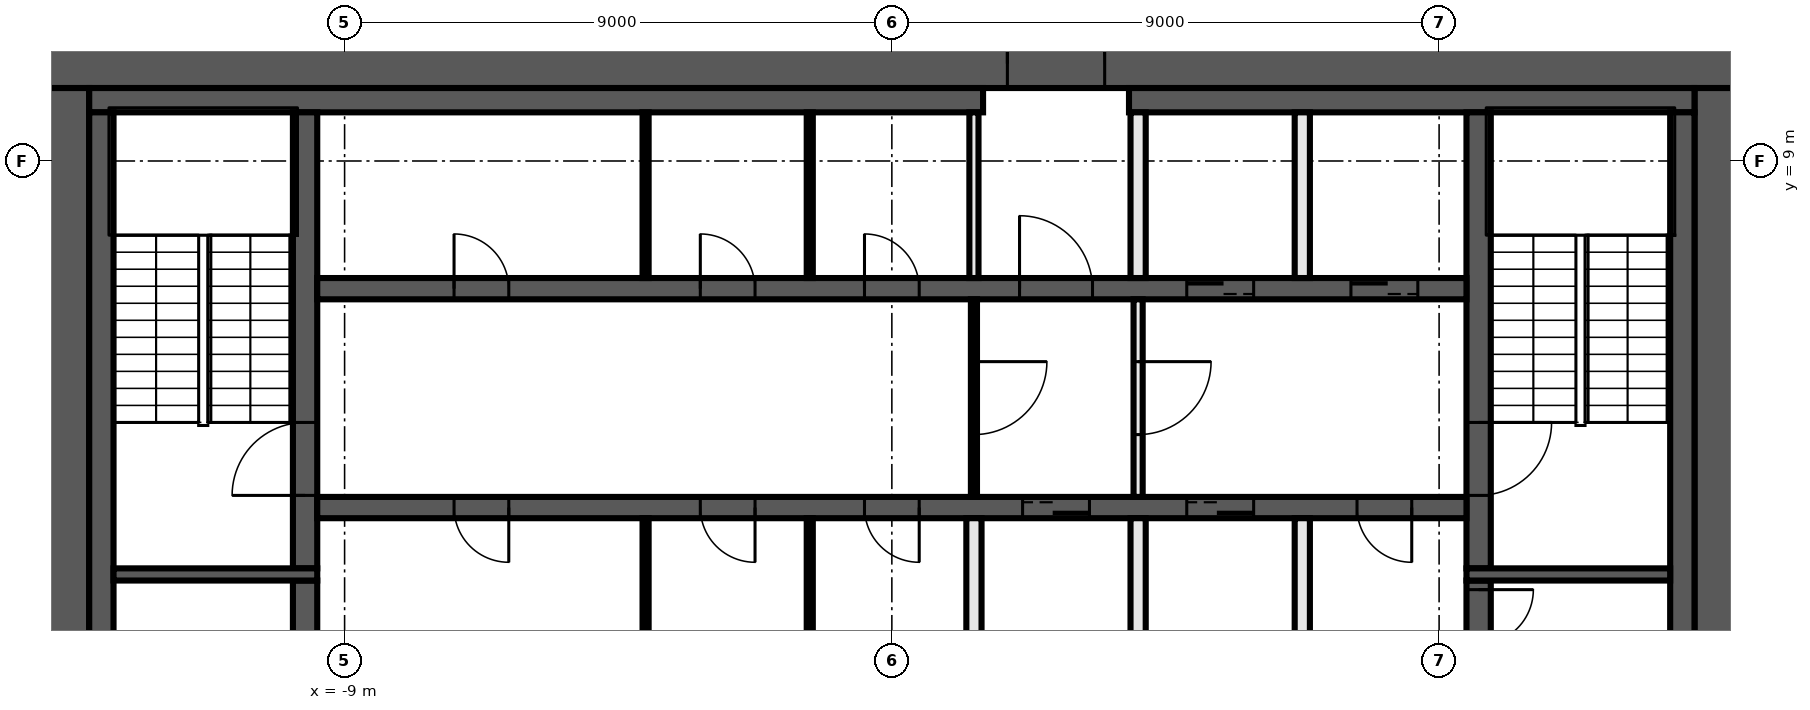
"""IFC4 building model, lengths in metres.
Left out: names, types, materials, properties, quantities, classifications, styles, units other than length and angle.
Written with IfcOpenShell. Run it as: python <this file> out.ifc"""

import sys

from ifc_helpers import new_model, si_unit, direction, frame, frame_2d, origin, place, context, subcontext, project, spatial, rectangle, extrude, element, fill, save


model = new_model("IFC4")
c1 = context("Model", 3, precision=1e-05, world=origin(), true_north=direction((0.0, 1.0)))
c2 = subcontext(c1, "Body", "Model", "MODEL_VIEW")
j1 = project(units=[si_unit("LENGTHUNIT", "METRE"), si_unit("PLANEANGLEUNIT", "RADIAN")], contexts=[c1])
p1 = place(None, origin())
s1 = spatial("IfcSite", under=j1, at=p1, CompositionType="ELEMENT")
p2 = place(p1, origin())
s2 = spatial("IfcBuilding", under=s1, at=p2, CompositionType="ELEMENT")
p3 = place(p2, frame((0.0, 0.0, 162.8)))
s3 = spatial("IfcBuildingStorey", under=s2, at=p3, CompositionType="ELEMENT", Elevation=162.8)
p4 = place(p3, frame((-14.0, 10.6, 0.0), z_axis=(0.0, 0.0, 1.0), x_axis=(1.0, 0.0, 0.0)))
e1 = element("IfcWall", 1, at=p4, inside=s3, PredefinedType="SHEAR", context=c2, shape_type="SweptSolid", body=[
    extrude(rectangle(XDim=28.0, YDim=0.8, at=frame_2d((14.0, 0.0))), origin(), (0.0, 0.0, 1.0), 3.82),
])
p5 = place(p4, frame((15.9, 0.0, 0.0)))
e2 = element("IfcOpeningElement", 2, at=p5, cuts=e1, PredefinedType="OPENING", context=c2, shape_type="SweptSolid", body=[
    extrude(rectangle(XDim=1.6, YDim=2.1, at=frame_2d((0.8, 1.05))), frame((0.0, 0.41, 0.0), z_axis=(0.0, -1.0, 0.0), x_axis=(1.0, 0.0, 0.0)), (0.0, 0.0, 1.0), 0.82),
])
for number, where, z_axis, x_axis in (
    (3, (13.6, 10.2, 0.0), (0.0, 0.0, 1.0), (0.0, -1.0, 0.0)),
    (4, (-13.6, -10.2, 0.0), (0.0, 0.0, 1.0), (0.0, 1.0, 0.0)),
):
    element("IfcWall", number, at=place(p3, frame(where, z_axis=z_axis, x_axis=x_axis)), inside=s3, PredefinedType="SHEAR", context=c2, shape_type="SweptSolid", body=[
        extrude(rectangle(XDim=20.4, YDim=0.8, at=frame_2d((10.2, 0.0))), origin(), (0.0, 0.0, 1.0), 3.82),
    ])
p6 = place(p3, frame((-13.2, 10.0, 0.0), z_axis=(0.0, 0.0, 1.0), x_axis=(1.0, 0.0, 0.0)))
e5 = element("IfcWall", 5, at=p6, inside=s3, PredefinedType="SHEAR", context=c2, shape_type="SweptSolid", body=[
    extrude(rectangle(XDim=14.7, YDim=0.4, at=frame_2d((7.35, 0.0))), origin(), (0.0, 0.0, 1.0), 3.82),
])
p7 = place(p3, frame((3.9, 10.0, 0.0), z_axis=(0.0, 0.0, 1.0), x_axis=(1.0, 0.0, 0.0)))
e6 = element("IfcWall", 6, at=p7, inside=s3, PredefinedType="SHEAR", context=c2, shape_type="SweptSolid", body=[
    extrude(rectangle(XDim=9.3, YDim=0.4, at=frame_2d((4.65, 0.0))), origin(), (0.0, 0.0, 1.0), 3.82),
])
for number, where, z_axis, x_axis in (
    (7, (13.0, 9.8, 0.0), (0.0, 0.0, 1.0), (0.0, -1.0, 0.0)),
    (8, (-13.0, -9.8, 0.0), (0.0, 0.0, 1.0), (0.0, 1.0, 0.0)),
):
    element("IfcWall", number, at=place(p3, frame(where, z_axis=z_axis, x_axis=x_axis)), inside=s3, PredefinedType="SHEAR", context=c2, shape_type="SweptSolid", body=[
        extrude(rectangle(XDim=19.6, YDim=0.4, at=frame_2d((9.8, 0.0))), origin(), (0.0, 0.0, 1.0), 3.82),
    ])
p8 = place(p3, frame((9.65, 2.1, 0.0), z_axis=(0.0, 0.0, 1.0), x_axis=(0.0, -1.0, 0.0)))
e9 = element("IfcWall", 9, at=p8, inside=s3, PredefinedType="SHEAR", context=c2, shape_type="SweptSolid", body=[
    extrude(rectangle(XDim=4.2, YDim=0.4, at=frame_2d((2.1, 0.0))), origin(), (0.0, 0.0, 1.0), 3.82),
])
p9 = place(p8, frame((0.15, 0.0, 0.0)))
e10 = element("IfcOpeningElement", 10, at=p9, cuts=e9, PredefinedType="OPENING", context=c2, shape_type="SweptSolid", body=[
    extrude(rectangle(XDim=0.9, YDim=2.1, at=frame_2d((0.45, 1.05))), frame((0.0, 0.21, 0.0), z_axis=(0.0, -1.0, 0.0), x_axis=(1.0, 0.0, 0.0)), (0.0, 0.0, 1.0), 0.42),
])
p10 = place(p3, frame((9.65, 9.8, 0.0), z_axis=(0.0, 0.0, 1.0), x_axis=(0.0, -1.0, 0.0)))
e11 = element("IfcWall", 11, at=p10, inside=s3, PredefinedType="SHEAR", context=c2, shape_type="SweptSolid", body=[
    extrude(rectangle(XDim=7.5, YDim=0.4, at=frame_2d((3.75, 0.0))), origin(), (0.0, 0.0, 1.0), 3.82),
])
p11 = place(p10, frame((5.1, 0.0, 0.0)))
e12 = element("IfcOpeningElement", 12, at=p11, cuts=e11, PredefinedType="OPENING", context=c2, shape_type="SweptSolid", body=[
    extrude(rectangle(XDim=1.2, YDim=2.1, at=frame_2d((0.6, 1.05))), frame((0.0, 0.21, 0.0), z_axis=(0.0, -1.0, 0.0), x_axis=(1.0, 0.0, 0.0)), (0.0, 0.0, 1.0), 0.42),
])
p12 = place(p3, frame((-9.65, -2.1, 0.0), z_axis=(0.0, 0.0, 1.0), x_axis=(0.0, 1.0, 0.0)))
e13 = element("IfcWall", 13, at=p12, inside=s3, PredefinedType="SHEAR", context=c2, shape_type="SweptSolid", body=[
    extrude(rectangle(XDim=4.2, YDim=0.4, at=frame_2d((2.1, 0.0))), origin(), (0.0, 0.0, 1.0), 3.82),
])
p13 = place(p3, frame((-9.65, 2.3, 0.0), z_axis=(0.0, 0.0, 1.0), x_axis=(0.0, 1.0, 0.0)))
e14 = element("IfcWall", 14, at=p13, inside=s3, PredefinedType="SHEAR", context=c2, shape_type="SweptSolid", body=[
    extrude(rectangle(XDim=7.5, YDim=0.4, at=frame_2d((3.75, 0.0))), origin(), (0.0, 0.0, 1.0), 3.82),
])
p14 = place(p13, frame((1.2, 0.0, 0.0)))
e15 = element("IfcOpeningElement", 15, at=p14, cuts=e14, PredefinedType="OPENING", context=c2, shape_type="SweptSolid", body=[
    extrude(rectangle(XDim=1.2, YDim=2.1, at=frame_2d((0.6, 1.05))), frame((0.0, 0.21, 0.0), z_axis=(0.0, -1.0, 0.0), x_axis=(1.0, 0.0, 0.0)), (0.0, 0.0, 1.0), 0.42),
])
for number, where, z_axis, x_axis in (
    (16, (9.45, 2.2, 0.0), (0.0, 0.0, 1.0), (1.0, 0.0, 0.0)),
    (17, (-9.45, 2.2, 0.0), (0.0, 0.0, 1.0), (-1.0, 0.0, 0.0)),
):
    element("IfcWall", number, at=place(p3, frame(where, z_axis=z_axis, x_axis=x_axis)), inside=s3, PredefinedType="SHEAR", context=c2, shape_type="SweptSolid", body=[
        extrude(rectangle(XDim=3.35, YDim=0.2, at=frame_2d((1.675, 0.0))), origin(), (0.0, 0.0, 1.0), 3.82),
    ])
p15 = place(p3, frame((-9.45, 6.9, 0.0), z_axis=(0.0, 0.0, 1.0), x_axis=(1.0, 0.0, 0.0)))
e18 = element("IfcWall", 18, at=p15, inside=s3, PredefinedType="SHEAR", context=c2, shape_type="SweptSolid", body=[
    extrude(rectangle(XDim=18.9, YDim=0.35, at=frame_2d((9.45, 0.0))), origin(), (0.0, 0.0, 1.0), 3.82),
])
p16 = place(p15, frame((11.55, 0.0, 0.0)))
e19 = element("IfcOpeningElement", 19, at=p16, cuts=e18, PredefinedType="OPENING", context=c2, shape_type="SweptSolid", body=[
    extrude(rectangle(XDim=1.2, YDim=2.1, at=frame_2d((0.6, 1.05))), frame((0.0, 0.185, 0.0), z_axis=(0.0, -1.0, 0.0), x_axis=(1.0, 0.0, 0.0)), (0.0, 0.0, 1.0), 0.37),
])
p17 = place(p15, frame((14.3, 0.0, 0.0)))
e20 = element("IfcOpeningElement", 20, at=p17, cuts=e18, PredefinedType="OPENING", context=c2, shape_type="SweptSolid", body=[
    extrude(rectangle(XDim=1.1, YDim=2.1, at=frame_2d((0.55, 1.05))), frame((0.0, 0.185, 0.0), z_axis=(0.0, -1.0, 0.0), x_axis=(1.0, 0.0, 0.0)), (0.0, 0.0, 1.0), 0.37),
])
p18 = place(p15, frame((17.0, 0.0, 0.0)))
e21 = element("IfcOpeningElement", 21, at=p18, cuts=e18, PredefinedType="OPENING", context=c2, shape_type="SweptSolid", body=[
    extrude(rectangle(XDim=1.1, YDim=2.1, at=frame_2d((0.55, 1.05))), frame((0.0, 0.185, 0.0), z_axis=(0.0, -1.0, 0.0), x_axis=(1.0, 0.0, 0.0)), (0.0, 0.0, 1.0), 0.37),
])
p19 = place(p15, frame((2.25, 0.0, 0.0)))
e22 = element("IfcOpeningElement", 22, at=p19, cuts=e18, PredefinedType="OPENING", context=c2, shape_type="SweptSolid", body=[
    extrude(rectangle(XDim=0.9, YDim=2.1, at=frame_2d((0.45, 1.05))), frame((0.0, 0.185, 0.0), z_axis=(0.0, -1.0, 0.0), x_axis=(1.0, 0.0, 0.0)), (0.0, 0.0, 1.0), 0.37),
])
p20 = place(p15, frame((6.3, 0.0, 0.0)))
e23 = element("IfcOpeningElement", 23, at=p20, cuts=e18, PredefinedType="OPENING", context=c2, shape_type="SweptSolid", body=[
    extrude(rectangle(XDim=0.9, YDim=2.1, at=frame_2d((0.45, 1.05))), frame((0.0, 0.185, 0.0), z_axis=(0.0, -1.0, 0.0), x_axis=(1.0, 0.0, 0.0)), (0.0, 0.0, 1.0), 0.37),
])
p21 = place(p15, frame((9.0, 0.0, 0.0)))
e24 = element("IfcOpeningElement", 24, at=p21, cuts=e18, PredefinedType="OPENING", context=c2, shape_type="SweptSolid", body=[
    extrude(rectangle(XDim=0.9, YDim=2.1, at=frame_2d((0.45, 1.05))), frame((0.0, 0.185, 0.0), z_axis=(0.0, -1.0, 0.0), x_axis=(1.0, 0.0, 0.0)), (0.0, 0.0, 1.0), 0.37),
])
p22 = place(p3, frame((9.45, 3.3, 0.0), z_axis=(0.0, 0.0, 1.0), x_axis=(-1.0, 0.0, 0.0)))
e25 = element("IfcWall", 25, at=p22, inside=s3, PredefinedType="SHEAR", context=c2, shape_type="SweptSolid", body=[
    extrude(rectangle(XDim=18.9, YDim=0.35, at=frame_2d((9.45, 0.0))), origin(), (0.0, 0.0, 1.0), 3.82),
])
p23 = place(p22, frame((6.2, 0.0, 0.0)))
e26 = element("IfcOpeningElement", 26, at=p23, cuts=e25, PredefinedType="OPENING", context=c2, shape_type="SweptSolid", body=[
    extrude(rectangle(XDim=1.1, YDim=2.1, at=frame_2d((0.55, 1.05))), frame((0.0, 0.185, 0.0), z_axis=(0.0, -1.0, 0.0), x_axis=(1.0, 0.0, 0.0)), (0.0, 0.0, 1.0), 0.37),
])
p24 = place(p22, frame((3.5, 0.0, 0.0)))
e27 = element("IfcOpeningElement", 27, at=p24, cuts=e25, PredefinedType="OPENING", context=c2, shape_type="SweptSolid", body=[
    extrude(rectangle(XDim=1.1, YDim=2.1, at=frame_2d((0.55, 1.05))), frame((0.0, 0.185, 0.0), z_axis=(0.0, -1.0, 0.0), x_axis=(1.0, 0.0, 0.0)), (0.0, 0.0, 1.0), 0.37),
])
p25 = place(p22, frame((0.9, 0.0, 0.0)))
e28 = element("IfcOpeningElement", 28, at=p25, cuts=e25, PredefinedType="OPENING", context=c2, shape_type="SweptSolid", body=[
    extrude(rectangle(XDim=0.9, YDim=2.1, at=frame_2d((0.45, 1.05))), frame((0.0, 0.185, 0.0), z_axis=(0.0, -1.0, 0.0), x_axis=(1.0, 0.0, 0.0)), (0.0, 0.0, 1.0), 0.37),
])
p26 = place(p22, frame((15.75, 0.0, 0.0)))
e29 = element("IfcOpeningElement", 29, at=p26, cuts=e25, PredefinedType="OPENING", context=c2, shape_type="SweptSolid", body=[
    extrude(rectangle(XDim=0.9, YDim=2.1, at=frame_2d((0.45, 1.05))), frame((0.0, 0.185, 0.0), z_axis=(0.0, -1.0, 0.0), x_axis=(1.0, 0.0, 0.0)), (0.0, 0.0, 1.0), 0.37),
])
p27 = place(p22, frame((11.7, 0.0, 0.0)))
e30 = element("IfcOpeningElement", 30, at=p27, cuts=e25, PredefinedType="OPENING", context=c2, shape_type="SweptSolid", body=[
    extrude(rectangle(XDim=0.9, YDim=2.1, at=frame_2d((0.45, 1.05))), frame((0.0, 0.185, 0.0), z_axis=(0.0, -1.0, 0.0), x_axis=(1.0, 0.0, 0.0)), (0.0, 0.0, 1.0), 0.37),
])
p28 = place(p22, frame((9.0, 0.0, 0.0)))
e31 = element("IfcOpeningElement", 31, at=p28, cuts=e25, PredefinedType="OPENING", context=c2, shape_type="SweptSolid", body=[
    extrude(rectangle(XDim=0.9, YDim=2.1, at=frame_2d((0.45, 1.05))), frame((0.0, 0.185, 0.0), z_axis=(0.0, -1.0, 0.0), x_axis=(1.0, 0.0, 0.0)), (0.0, 0.0, 1.0), 0.37),
])
for number, where, z_axis, x_axis in (
    (32, (6.75, 0.4, 0.0), (0.0, 0.0, 1.0), (0.0, 1.0, 0.0)),
    (33, (6.75, 7.075, 0.0), (0.0, 0.0, 1.0), (0.0, 1.0, 0.0)),
):
    element("IfcWall", number, at=place(p3, frame(where, z_axis=z_axis, x_axis=x_axis)), inside=s3, PredefinedType="SOLIDWALL", context=c2, shape_type="SweptSolid", body=[
        extrude(rectangle(XDim=2.725, YDim=0.25, at=frame_2d((1.363, 0.0))), origin(), (0.0, 0.0, 1.0), 3.82),
    ])
p29 = place(p3, frame((4.05, 6.725, 0.0), z_axis=(0.0, 0.0, 1.0), x_axis=(0.0, -1.0, 0.0)))
e34 = element("IfcWall", 34, at=p29, inside=s3, PredefinedType="PARTITIONING", context=c2, shape_type="SweptSolid", body=[
    extrude(rectangle(XDim=3.25, YDim=0.15, at=frame_2d((1.625, 0.0))), origin(), (0.0, 0.0, 1.0), 3.82),
])
p30 = place(p29, frame((1.025, 0.0, 0.0)))
e35 = element("IfcOpeningElement", 35, at=p30, cuts=e34, PredefinedType="OPENING", context=c2, shape_type="SweptSolid", body=[
    extrude(rectangle(XDim=1.2, YDim=2.1, at=frame_2d((0.6, 1.05))), frame((0.0, 0.085, 0.0), z_axis=(0.0, -1.0, 0.0), x_axis=(1.0, 0.0, 0.0)), (0.0, 0.0, 1.0), 0.17),
])
for number, where, z_axis, x_axis in (
    (36, (4.05, 0.4, 0.0), (0.0, 0.0, 1.0), (0.0, 1.0, 0.0)),
    (37, (4.05, 7.075, 0.0), (0.0, 0.0, 1.0), (0.0, 1.0, 0.0)),
):
    element("IfcWall", number, at=place(p3, frame(where, z_axis=z_axis, x_axis=x_axis)), inside=s3, PredefinedType="SOLIDWALL", context=c2, shape_type="SweptSolid", body=[
        extrude(rectangle(XDim=2.725, YDim=0.25, at=frame_2d((1.363, 0.0))), origin(), (0.0, 0.0, 1.0), 3.82),
    ])
p31 = place(p3, frame((1.35, 7.075, 0.0), z_axis=(0.0, 0.0, 1.0), x_axis=(0.0, 1.0, 0.0)))
e38 = element("IfcWall", 38, at=p31, inside=s3, PredefinedType="PARTITIONING", context=c2, shape_type="SweptSolid", body=[
    extrude(rectangle(XDim=2.725, YDim=0.15, at=frame_2d((1.363, 0.0))), origin(), (0.0, 0.0, 1.0), 3.82),
])
p32 = place(p3, frame((1.35, 6.725, 0.0), z_axis=(0.0, 0.0, 1.0), x_axis=(0.0, -1.0, 0.0)))
e39 = element("IfcWall", 39, at=p32, inside=s3, PredefinedType="PARTITIONING", context=c2, shape_type="SweptSolid", body=[
    extrude(rectangle(XDim=3.25, YDim=0.1, at=frame_2d((1.625, 0.0))), origin(), (0.0, 0.0, 1.0), 3.82),
])
p33 = place(p32, frame((1.025, 0.0, 0.0)))
e40 = element("IfcOpeningElement", 40, at=p33, cuts=e39, PredefinedType="OPENING", context=c2, shape_type="SweptSolid", body=[
    extrude(rectangle(XDim=1.2, YDim=2.1, at=frame_2d((0.6, 1.05))), frame((0.0, 0.06, 0.0), z_axis=(0.0, -1.0, 0.0), x_axis=(1.0, 0.0, 0.0)), (0.0, 0.0, 1.0), 0.12),
])
p34 = place(p3, frame((1.35, 0.4, 0.0), z_axis=(0.0, 0.0, 1.0), x_axis=(0.0, 1.0, 0.0)))
e41 = element("IfcWall", 41, at=p34, inside=s3, PredefinedType="SOLIDWALL", context=c2, shape_type="SweptSolid", body=[
    extrude(rectangle(XDim=2.725, YDim=0.25, at=frame_2d((1.363, 0.0))), origin(), (0.0, 0.0, 1.0), 3.82),
])
for number, where, z_axis, x_axis in (
    (42, (-1.35, 0.4, 0.0), (0.0, 0.0, 1.0), (0.0, 1.0, 0.0)),
    (43, (-1.35, 7.075, 0.0), (0.0, 0.0, 1.0), (0.0, 1.0, 0.0)),
    (44, (-4.05, 0.4, 0.0), (0.0, 0.0, 1.0), (0.0, 1.0, 0.0)),
    (45, (-4.05, 7.075, 0.0), (0.0, 0.0, 1.0), (0.0, 1.0, 0.0)),
):
    element("IfcWall", number, at=place(p3, frame(where, z_axis=z_axis, x_axis=x_axis)), inside=s3, PredefinedType="PARTITIONING", context=c2, shape_type="SweptSolid", body=[
        extrude(rectangle(XDim=2.725, YDim=0.1, at=frame_2d((1.363, 0.0))), origin(), (0.0, 0.0, 1.0), 3.82),
    ])
p35 = place(p9, origin())
e46 = element("IfcDoor", 46, at=p35, inside=s3, OperationType="SINGLE_SWING_RIGHT", PredefinedType="DOOR", context=c2, shape_type="SweptSolid", body=[
    extrude(rectangle(XDim=0.9, YDim=2.1, at=frame_2d((0.45, 1.05))), frame((0.0, 0.025, 0.0), z_axis=(0.0, -1.0, 0.0), x_axis=(1.0, 0.0, 0.0)), (0.0, 0.0, 1.0), 0.05),
])
fill(e10, e46)
p36 = place(p5, origin())
e47 = element("IfcDoor", 47, at=p36, inside=s3, OperationType="DOUBLE_DOOR_SINGLE_SWING", PredefinedType="DOOR", context=c2, shape_type="SweptSolid", body=[
    extrude(rectangle(XDim=1.6, YDim=2.1, at=frame_2d((0.8, 1.05))), frame((0.0, 0.025, 0.0), z_axis=(0.0, -1.0, 0.0), x_axis=(1.0, 0.0, 0.0)), (0.0, 0.0, 1.0), 0.05),
])
fill(e2, e47)
p37 = place(p16, origin())
e48 = element("IfcDoor", 48, at=p37, inside=s3, OperationType="SINGLE_SWING_LEFT", PredefinedType="DOOR", context=c2, shape_type="SweptSolid", body=[
    extrude(rectangle(XDim=1.2, YDim=2.1, at=frame_2d((0.6, 1.05))), frame((0.0, 0.025, 0.0), z_axis=(0.0, -1.0, 0.0), x_axis=(1.0, 0.0, 0.0)), (0.0, 0.0, 1.0), 0.05),
])
fill(e19, e48)
p38 = place(p17, origin())
e49 = element("IfcDoor", 49, at=p38, inside=s3, OperationType="DOUBLE_DOOR_SLIDING", PredefinedType="DOOR", context=c2, shape_type="SweptSolid", body=[
    extrude(rectangle(XDim=1.1, YDim=2.1, at=frame_2d((0.55, 1.05))), frame((0.0, 0.025, 0.0), z_axis=(0.0, -1.0, 0.0), x_axis=(1.0, 0.0, 0.0)), (0.0, 0.0, 1.0), 0.05),
])
fill(e20, e49)
p39 = place(p18, origin())
e50 = element("IfcDoor", 50, at=p39, inside=s3, OperationType="DOUBLE_DOOR_SLIDING", PredefinedType="DOOR", context=c2, shape_type="SweptSolid", body=[
    extrude(rectangle(XDim=1.1, YDim=2.1, at=frame_2d((0.55, 1.05))), frame((0.0, 0.025, 0.0), z_axis=(0.0, -1.0, 0.0), x_axis=(1.0, 0.0, 0.0)), (0.0, 0.0, 1.0), 0.05),
])
fill(e21, e50)
p40 = place(p23, origin())
e51 = element("IfcDoor", 51, at=p40, inside=s3, OperationType="DOUBLE_DOOR_SLIDING", PredefinedType="DOOR", context=c2, shape_type="SweptSolid", body=[
    extrude(rectangle(XDim=1.1, YDim=2.1, at=frame_2d((0.55, 1.05))), frame((0.0, 0.025, 0.0), z_axis=(0.0, -1.0, 0.0), x_axis=(1.0, 0.0, 0.0)), (0.0, 0.0, 1.0), 0.05),
])
fill(e26, e51)
p41 = place(p24, origin())
e52 = element("IfcDoor", 52, at=p41, inside=s3, OperationType="DOUBLE_DOOR_SLIDING", PredefinedType="DOOR", context=c2, shape_type="SweptSolid", body=[
    extrude(rectangle(XDim=1.1, YDim=2.1, at=frame_2d((0.55, 1.05))), frame((0.0, 0.025, 0.0), z_axis=(0.0, -1.0, 0.0), x_axis=(1.0, 0.0, 0.0)), (0.0, 0.0, 1.0), 0.05),
])
fill(e27, e52)
p42 = place(p25, origin())
e53 = element("IfcDoor", 53, at=p42, inside=s3, OperationType="SINGLE_SWING_LEFT", PredefinedType="DOOR", context=c2, shape_type="SweptSolid", body=[
    extrude(rectangle(XDim=0.9, YDim=2.1, at=frame_2d((0.45, 1.05))), frame((0.0, 0.025, 0.0), z_axis=(0.0, -1.0, 0.0), x_axis=(1.0, 0.0, 0.0)), (0.0, 0.0, 1.0), 0.05),
])
fill(e28, e53)
p43 = place(p19, origin())
e54 = element("IfcDoor", 54, at=p43, inside=s3, OperationType="SINGLE_SWING_RIGHT", PredefinedType="DOOR", context=c2, shape_type="SweptSolid", body=[
    extrude(rectangle(XDim=0.9, YDim=2.1, at=frame_2d((0.45, 1.05))), frame((0.0, 0.025, 0.0), z_axis=(0.0, -1.0, 0.0), x_axis=(1.0, 0.0, 0.0)), (0.0, 0.0, 1.0), 0.05),
])
fill(e22, e54)
p44 = place(p20, origin())
e55 = element("IfcDoor", 55, at=p44, inside=s3, OperationType="SINGLE_SWING_LEFT", PredefinedType="DOOR", context=c2, shape_type="SweptSolid", body=[
    extrude(rectangle(XDim=0.9, YDim=2.1, at=frame_2d((0.45, 1.05))), frame((0.0, 0.025, 0.0), z_axis=(0.0, -1.0, 0.0), x_axis=(1.0, 0.0, 0.0)), (0.0, 0.0, 1.0), 0.05),
])
fill(e23, e55)
p45 = place(p21, origin())
e56 = element("IfcDoor", 56, at=p45, inside=s3, OperationType="SINGLE_SWING_RIGHT", PredefinedType="DOOR", context=c2, shape_type="SweptSolid", body=[
    extrude(rectangle(XDim=0.9, YDim=2.1, at=frame_2d((0.45, 1.05))), frame((0.0, 0.025, 0.0), z_axis=(0.0, -1.0, 0.0), x_axis=(1.0, 0.0, 0.0)), (0.0, 0.0, 1.0), 0.05),
])
fill(e24, e56)
p46 = place(p26, origin())
e57 = element("IfcDoor", 57, at=p46, inside=s3, OperationType="SINGLE_SWING_LEFT", PredefinedType="DOOR", context=c2, shape_type="SweptSolid", body=[
    extrude(rectangle(XDim=0.9, YDim=2.1, at=frame_2d((0.45, 1.05))), frame((0.0, 0.025, 0.0), z_axis=(0.0, -1.0, 0.0), x_axis=(1.0, 0.0, 0.0)), (0.0, 0.0, 1.0), 0.05),
])
fill(e29, e57)
p47 = place(p27, origin())
e58 = element("IfcDoor", 58, at=p47, inside=s3, OperationType="SINGLE_SWING_RIGHT", PredefinedType="DOOR", context=c2, shape_type="SweptSolid", body=[
    extrude(rectangle(XDim=0.9, YDim=2.1, at=frame_2d((0.45, 1.05))), frame((0.0, 0.025, 0.0), z_axis=(0.0, -1.0, 0.0), x_axis=(1.0, 0.0, 0.0)), (0.0, 0.0, 1.0), 0.05),
])
fill(e30, e58)
p48 = place(p28, origin())
e59 = element("IfcDoor", 59, at=p48, inside=s3, OperationType="SINGLE_SWING_LEFT", PredefinedType="DOOR", context=c2, shape_type="SweptSolid", body=[
    extrude(rectangle(XDim=0.9, YDim=2.1, at=frame_2d((0.45, 1.05))), frame((0.0, 0.025, 0.0), z_axis=(0.0, -1.0, 0.0), x_axis=(1.0, 0.0, 0.0)), (0.0, 0.0, 1.0), 0.05),
])
fill(e31, e59)
p49 = place(p11, origin())
e60 = element("IfcDoor", 60, at=p49, inside=s3, OperationType="SINGLE_SWING_LEFT", PredefinedType="DOOR", context=c2, shape_type="SweptSolid", body=[
    extrude(rectangle(XDim=1.2, YDim=2.1, at=frame_2d((0.6, 1.05))), frame((0.0, 0.025, 0.0), z_axis=(0.0, -1.0, 0.0), x_axis=(1.0, 0.0, 0.0)), (0.0, 0.0, 1.0), 0.05),
])
fill(e12, e60)
p50 = place(p14, origin())
e61 = element("IfcDoor", 61, at=p50, inside=s3, OperationType="SINGLE_SWING_RIGHT", PredefinedType="DOOR", context=c2, shape_type="SweptSolid", body=[
    extrude(rectangle(XDim=1.2, YDim=2.1, at=frame_2d((0.6, 1.05))), frame((0.0, 0.025, 0.0), z_axis=(0.0, -1.0, 0.0), x_axis=(1.0, 0.0, 0.0)), (0.0, 0.0, 1.0), 0.05),
])
fill(e15, e61)
p51 = place(p33, origin())
e62 = element("IfcDoor", 62, at=p51, inside=s3, OperationType="SINGLE_SWING_LEFT", PredefinedType="DOOR", context=c2, shape_type="SweptSolid", body=[
    extrude(rectangle(XDim=1.2, YDim=2.1, at=frame_2d((0.6, 1.05))), frame((0.0, 0.025, 0.0), z_axis=(0.0, -1.0, 0.0), x_axis=(1.0, 0.0, 0.0)), (0.0, 0.0, 1.0), 0.05),
])
fill(e40, e62)
p52 = place(p30, origin())
e63 = element("IfcDoor", 63, at=p52, inside=s3, OperationType="SINGLE_SWING_RIGHT", PredefinedType="DOOR", context=c2, shape_type="SweptSolid", body=[
    extrude(rectangle(XDim=1.2, YDim=2.1, at=frame_2d((0.6, 1.05))), frame((0.0, 0.025, 0.0), z_axis=(0.0, -1.0, 0.0), x_axis=(1.0, 0.0, 0.0)), (0.0, 0.0, 1.0), 0.05),
])
fill(e35, e63)
save(model, sys.argv[1])
